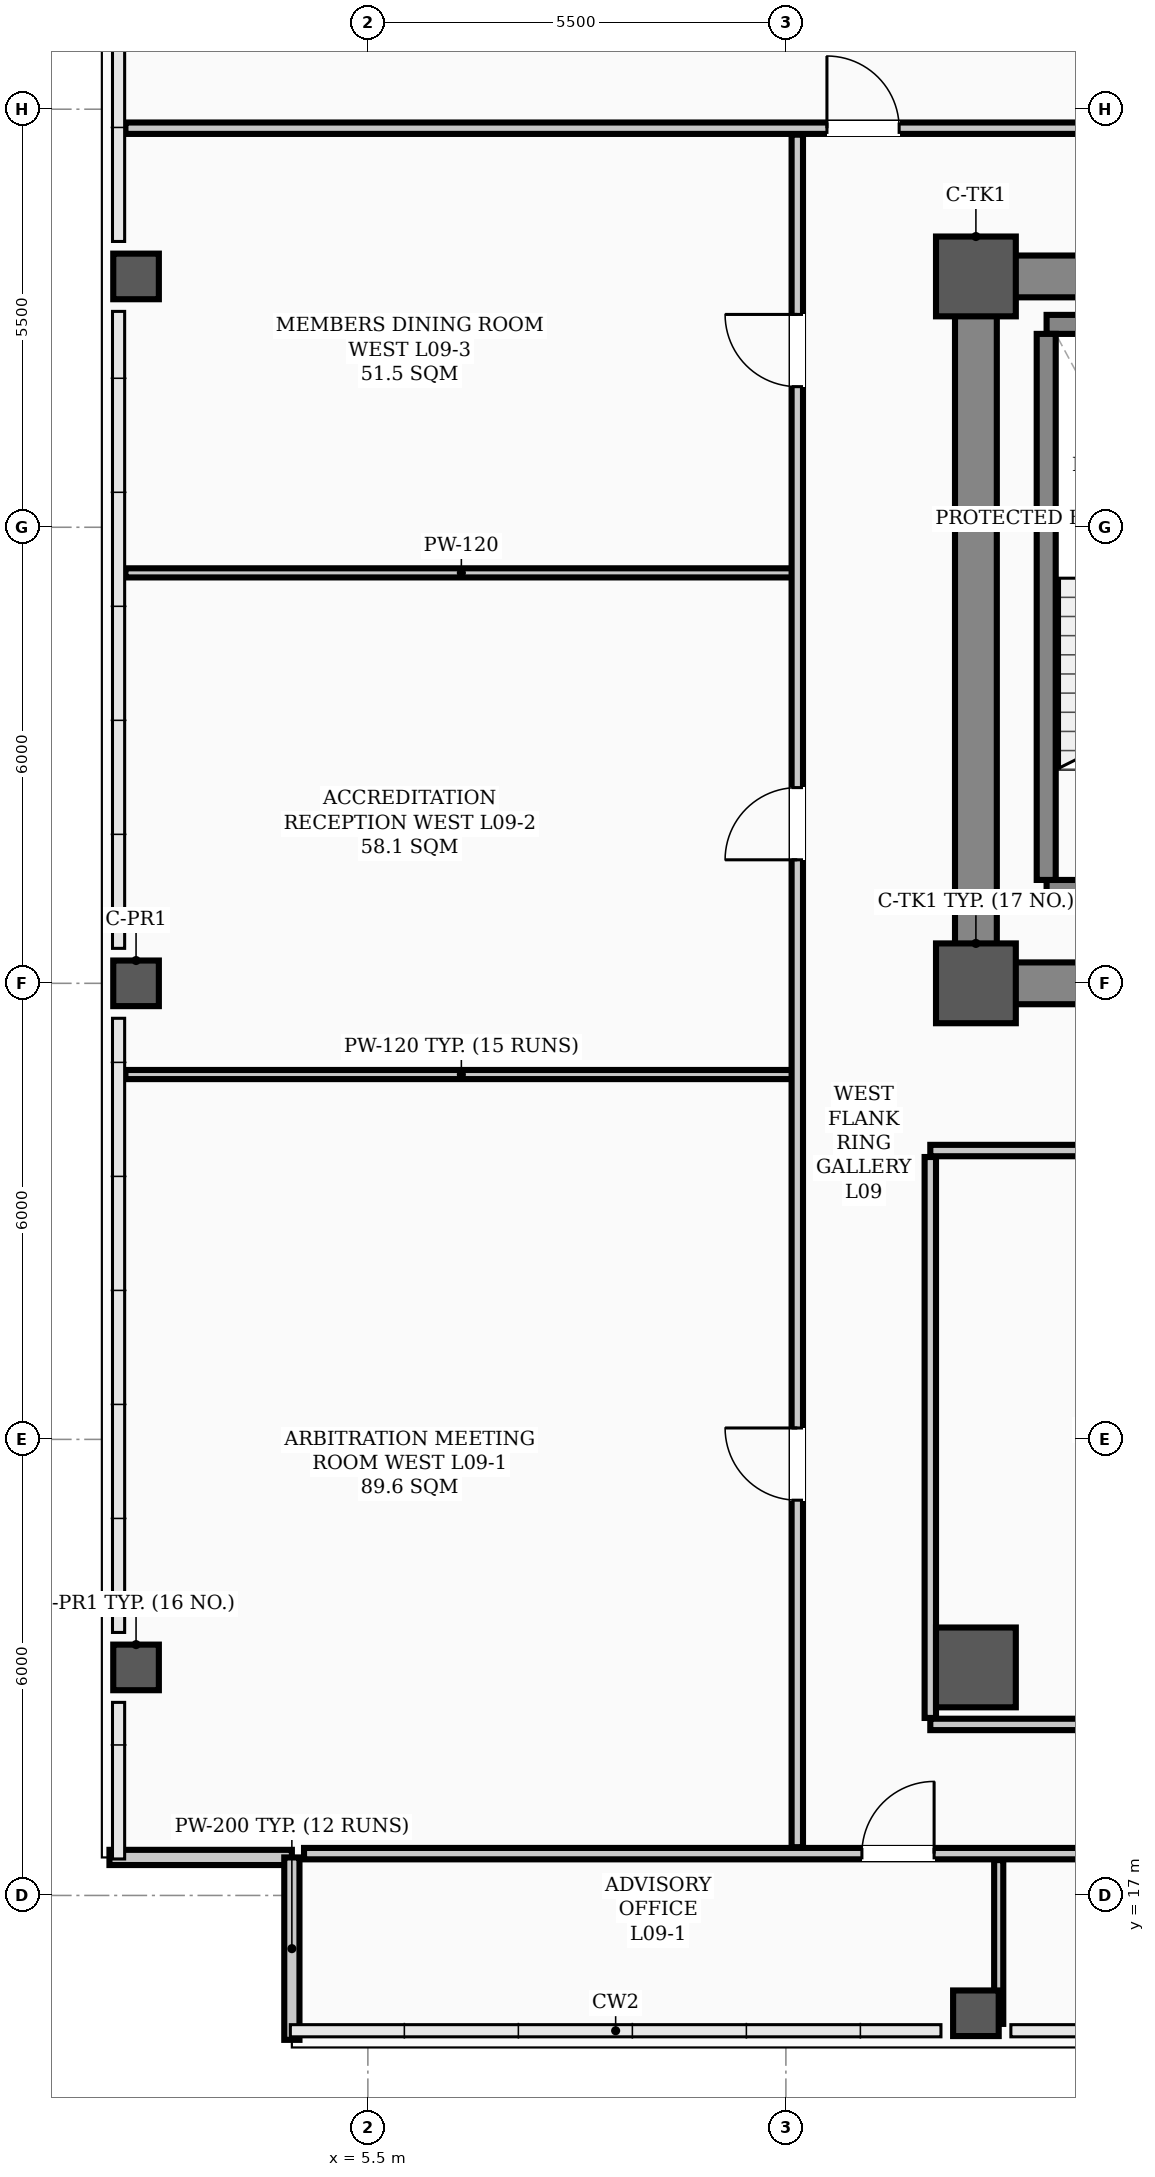
"""IFC4 building model, lengths in metres.
Left out: names, types, materials, properties, quantities, classifications, styles, units other than length and angle.
Written with IfcOpenShell. Run it as: python <this file> out.ifc"""

import sys

from ifc_helpers import new_model, si_unit, direction, frame, frame_2d, origin, origin_2d, place, context, subcontext, project, spatial, rectangle, hollow_rectangle, extrude, element, fill, save


model = new_model("IFC4")
c1 = context("Model", 3, precision=1e-05, world=origin(), true_north=direction((0.0, 1.0)))
c2 = subcontext(c1, "Body", "Model", "MODEL_VIEW")
j1 = project(units=[si_unit("LENGTHUNIT", "METRE"), si_unit("PLANEANGLEUNIT", "RADIAN")], contexts=[c1])
p1 = place(None, origin())
s1 = spatial("IfcSite", under=j1, at=p1, CompositionType="ELEMENT")
p2 = place(p1, origin())
s2 = spatial("IfcBuilding", under=s1, at=p2, CompositionType="ELEMENT")
p3 = place(p2, frame((0.0, 0.0, 38.2)))
s3 = spatial("IfcBuildingStorey", under=s2, at=p3, CompositionType="ELEMENT", Elevation=38.2)
for number, where, z_axis, x_axis in (
    (1, (13.5, 29.0, 0.0), (0.0, 0.0, 1.0), (1.0, 0.0, 0.0)),
    (2, (13.5, 38.3, 0.0), (0.0, 0.0, 1.0), (1.0, 0.0, 0.0)),
    (3, (13.5, 20.0, 0.0), (0.0, 0.0, 1.0), (1.0, 0.0, 0.0)),
):
    element("IfcColumn", number, at=place(p3, frame(where, z_axis=z_axis, x_axis=x_axis)), inside=s3, PredefinedType="COLUMN", context=c2, shape_type="SweptSolid", body=[
        extrude(hollow_rectangle(XDim=1.05, YDim=1.05, WallThickness=0.038, InnerFilletRadius=0.019, OuterFilletRadius=0.057, at=origin_2d()), origin(), (0.0, 0.0, 1.0), 3.9),
    ])
for number, where, z_axis, x_axis in (
    (4, (2.45, 20.0, 0.0), (0.0, 0.0, 1.0), (1.0, 0.0, 0.0)),
    (5, (2.45, 29.0, 0.0), (0.0, 0.0, 1.0), (1.0, 0.0, 0.0)),
    (6, (2.45, 38.3, 0.0), (0.0, 0.0, 1.0), (1.0, 0.0, 0.0)),
    (7, (13.5, 15.45, 0.0), (0.0, 0.0, 1.0), (1.0, 0.0, 0.0)),
):
    element("IfcColumn", number, at=place(p3, frame(where, z_axis=z_axis, x_axis=x_axis)), inside=s3, PredefinedType="COLUMN", context=c2, shape_type="SweptSolid", body=[
        extrude(hollow_rectangle(XDim=0.6, YDim=0.6, WallThickness=0.026, InnerFilletRadius=0.013, OuterFilletRadius=0.039, at=origin_2d()), origin(), (0.0, 0.0, 1.0), 3.9),
    ])
for number, where, z_axis, x_axis in (
    (8, (2.1, 17.5, 0.0), (0.0, 0.0, 1.0), (1.0, 0.0, 0.0)),
    (9, (4.5, 17.5, 0.0), (0.0, 0.0, 1.0), (0.0, -1.0, 0.0)),
):
    element("IfcWall", number, at=place(p3, frame(where, z_axis=z_axis, x_axis=x_axis)), inside=s3, PredefinedType="PARAPET", context=c2, shape_type="SweptSolid", body=[
        extrude(rectangle(XDim=2.4, YDim=0.2, at=frame_2d((1.2, 0.0))), origin(), (0.0, 0.0, 1.0), 1.2),
    ])
p4 = place(p3, frame((13.5, 29.0, 0.0), z_axis=(0.0, 0.0, 1.0), x_axis=(1.0, 0.0, 0.0)))
e10 = element("IfcWall", 10, at=p4, inside=s3, PredefinedType="SHEAR", context=c2, shape_type="SweptSolid", body=[
    extrude(rectangle(XDim=30.5, YDim=0.55, at=frame_2d((15.25, 0.0))), origin(), (0.0, 0.0, 1.0), 3.72),
])
p5 = place(p4, frame((1.75, 0.0, 0.0)))
e11 = element("IfcOpeningElement", 11, at=p5, cuts=e10, PredefinedType="OPENING", context=c2, shape_type="SweptSolid", body=[
    extrude(rectangle(XDim=1.1, YDim=2.08, at=frame_2d((0.55, 1.04))), frame((0.0, 0.285, 0.0), z_axis=(0.0, -1.0, 0.0), x_axis=(1.0, 0.0, 0.0)), (0.0, 0.0, 1.0), 0.57),
])
p6 = place(p4, frame((26.7, 0.0, 0.0)))
e12 = element("IfcOpeningElement", 12, at=p6, cuts=e10, PredefinedType="OPENING", context=c2, shape_type="SweptSolid", body=[
    extrude(rectangle(XDim=1.1, YDim=2.08, at=frame_2d((0.55, 1.04))), frame((0.0, 0.285, 0.0), z_axis=(0.0, -1.0, 0.0), x_axis=(1.0, 0.0, 0.0)), (0.0, 0.0, 1.0), 0.57),
])
p7 = place(p4, frame((6.8, 0.0, 0.0)))
e13 = element("IfcOpeningElement", 13, at=p7, cuts=e10, PredefinedType="OPENING", context=c2, shape_type="SweptSolid", body=[
    extrude(rectangle(XDim=1.1, YDim=2.08, at=frame_2d((0.55, 1.04))), frame((0.0, 0.285, 0.0), z_axis=(0.0, -1.0, 0.0), x_axis=(1.0, 0.0, 0.0)), (0.0, 0.0, 1.0), 0.57),
])
p8 = place(p4, frame((13.2, 0.0, 0.0)))
e14 = element("IfcOpeningElement", 14, at=p8, cuts=e10, PredefinedType="OPENING", context=c2, shape_type="SweptSolid", body=[
    extrude(rectangle(XDim=1.6, YDim=2.08, at=frame_2d((0.8, 1.04))), frame((0.0, 0.285, 0.0), z_axis=(0.0, -1.0, 0.0), x_axis=(1.0, 0.0, 0.0)), (0.0, 0.0, 1.0), 0.57),
])
p9 = place(p4, frame((19.5, 0.0, 0.0)))
e15 = element("IfcOpeningElement", 15, at=p9, cuts=e10, PredefinedType="OPENING", context=c2, shape_type="SweptSolid", body=[
    extrude(rectangle(XDim=0.9, YDim=2.08, at=frame_2d((0.45, 1.04))), frame((0.0, 0.285, 0.0), z_axis=(0.0, -1.0, 0.0), x_axis=(1.0, 0.0, 0.0)), (0.0, 0.0, 1.0), 0.57),
])
p10 = place(p4, frame((21.55, 0.0, 0.0)))
e16 = element("IfcOpeningElement", 16, at=p10, cuts=e10, PredefinedType="OPENING", context=c2, shape_type="SweptSolid", body=[
    extrude(rectangle(XDim=0.9, YDim=2.08, at=frame_2d((0.45, 1.04))), frame((0.0, 0.285, 0.0), z_axis=(0.0, -1.0, 0.0), x_axis=(1.0, 0.0, 0.0)), (0.0, 0.0, 1.0), 0.57),
])
p11 = place(p3, frame((13.5, 38.3, 0.0), z_axis=(0.0, 0.0, 1.0), x_axis=(1.0, 0.0, 0.0)))
e17 = element("IfcWall", 17, at=p11, inside=s3, PredefinedType="SHEAR", context=c2, shape_type="SweptSolid", body=[
    extrude(rectangle(XDim=30.5, YDim=0.55, at=frame_2d((15.25, 0.0))), origin(), (0.0, 0.0, 1.0), 3.72),
])
p12 = place(p3, frame((13.5, 29.35, 0.0), z_axis=(0.0, 0.0, 1.0), x_axis=(0.0, 1.0, 0.0)))
e18 = element("IfcWall", 18, at=p12, inside=s3, PredefinedType="SHEAR", context=c2, shape_type="SweptSolid", body=[
    extrude(rectangle(XDim=8.6, YDim=0.55, at=frame_2d((4.3, 0.0))), origin(), (0.0, 0.0, 1.0), 3.72),
])
p13 = place(p3, frame((14.43, 30.235, 0.0), z_axis=(0.0, 0.0, 1.0), x_axis=(1.0, 0.0, 0.0)))
e19 = element("IfcWall", 19, at=p13, inside=s3, PredefinedType="STANDARD", context=c2, shape_type="SweptSolid", body=[
    extrude(rectangle(XDim=3.34, YDim=0.25, at=frame_2d((1.67, 0.0))), origin(), (0.0, 0.0, 1.0), 3.72),
])
p14 = place(p13, frame((1.1, 0.0, 0.0)))
e20 = element("IfcOpeningElement", 20, at=p14, cuts=e19, PredefinedType="OPENING", context=c2, shape_type="SweptSolid", body=[
    extrude(rectangle(XDim=1.1, YDim=2.08, at=frame_2d((0.55, 1.04))), frame((0.0, 0.135, 0.0), z_axis=(0.0, -1.0, 0.0), x_axis=(1.0, 0.0, 0.0)), (0.0, 0.0, 1.0), 0.27),
])
p15 = place(p3, frame((14.43, 37.669, 0.0), z_axis=(0.0, 0.0, 1.0), x_axis=(1.0, 0.0, 0.0)))
e21 = element("IfcWall", 21, at=p15, inside=s3, PredefinedType="STANDARD", context=c2, shape_type="SweptSolid", body=[
    extrude(rectangle(XDim=3.34, YDim=0.25, at=frame_2d((1.67, 0.0))), origin(), (0.0, 0.0, 1.0), 3.72),
])
p16 = place(p3, frame((14.425, 30.36, 0.0), z_axis=(0.0, 0.0, 1.0), x_axis=(0.0, 1.0, 0.0)))
e22 = element("IfcWall", 22, at=p16, inside=s3, PredefinedType="STANDARD", context=c2, shape_type="SweptSolid", body=[
    extrude(rectangle(XDim=7.184, YDim=0.25, at=frame_2d((3.592, 0.0))), origin(), (0.0, 0.0, 1.0), 3.72),
])
p17 = place(p3, frame((12.9, 26.8, 0.0), z_axis=(0.0, 0.0, 1.0), x_axis=(1.0, 0.0, 0.0)))
e23 = element("IfcWall", 23, at=p17, inside=s3, PredefinedType="PARTITIONING", context=c2, shape_type="SweptSolid", body=[
    extrude(rectangle(XDim=31.7, YDim=0.15, at=frame_2d((15.85, 0.0))), origin(), (0.0, 0.0, 1.0), 3.1),
])
p18 = place(p17, frame((13.6, 0.0, 0.0)))
e24 = element("IfcOpeningElement", 24, at=p18, cuts=e23, PredefinedType="OPENING", context=c2, shape_type="SweptSolid", body=[
    extrude(rectangle(XDim=1.6, YDim=2.08, at=frame_2d((0.8, 1.04))), frame((0.0, 0.085, 0.0), z_axis=(0.0, -1.0, 0.0), x_axis=(1.0, 0.0, 0.0)), (0.0, 0.0, 1.0), 0.17),
])
p19 = place(p17, frame((2.875, 0.0, 0.0)))
e25 = element("IfcOpeningElement", 25, at=p19, cuts=e23, PredefinedType="OPENING", context=c2, shape_type="SweptSolid", body=[
    extrude(rectangle(XDim=0.95, YDim=2.08, at=frame_2d((0.475, 1.04))), frame((0.0, 0.085, 0.0), z_axis=(0.0, -1.0, 0.0), x_axis=(1.0, 0.0, 0.0)), (0.0, 0.0, 1.0), 0.17),
])
p20 = place(p17, frame((8.625, 0.0, 0.0)))
e26 = element("IfcOpeningElement", 26, at=p20, cuts=e23, PredefinedType="OPENING", context=c2, shape_type="SweptSolid", body=[
    extrude(rectangle(XDim=0.95, YDim=2.08, at=frame_2d((0.475, 1.04))), frame((0.0, 0.085, 0.0), z_axis=(0.0, -1.0, 0.0), x_axis=(1.0, 0.0, 0.0)), (0.0, 0.0, 1.0), 0.17),
])
p21 = place(p17, frame((16.075, 0.0, 0.0)))
e27 = element("IfcOpeningElement", 27, at=p21, cuts=e23, PredefinedType="OPENING", context=c2, shape_type="SweptSolid", body=[
    extrude(rectangle(XDim=0.95, YDim=2.08, at=frame_2d((0.475, 1.04))), frame((0.0, 0.085, 0.0), z_axis=(0.0, -1.0, 0.0), x_axis=(1.0, 0.0, 0.0)), (0.0, 0.0, 1.0), 0.17),
])
p22 = place(p17, frame((21.875, 0.0, 0.0)))
e28 = element("IfcOpeningElement", 28, at=p22, cuts=e23, PredefinedType="OPENING", context=c2, shape_type="SweptSolid", body=[
    extrude(rectangle(XDim=0.95, YDim=2.08, at=frame_2d((0.475, 1.04))), frame((0.0, 0.085, 0.0), z_axis=(0.0, -1.0, 0.0), x_axis=(1.0, 0.0, 0.0)), (0.0, 0.0, 1.0), 0.17),
])
p23 = place(p17, frame((29.025, 0.0, 0.0)))
e29 = element("IfcOpeningElement", 29, at=p23, cuts=e23, PredefinedType="OPENING", context=c2, shape_type="SweptSolid", body=[
    extrude(rectangle(XDim=0.95, YDim=2.08, at=frame_2d((0.475, 1.04))), frame((0.0, 0.085, 0.0), z_axis=(0.0, -1.0, 0.0), x_axis=(1.0, 0.0, 0.0)), (0.0, 0.0, 1.0), 0.17),
])
p24 = place(p3, frame((4.66, 17.55, 0.0), z_axis=(0.0, 0.0, 1.0), x_axis=(1.0, 0.0, 0.0)))
e30 = element("IfcWall", 30, at=p24, inside=s3, PredefinedType="PARTITIONING", context=c2, shape_type="SweptSolid", body=[
    extrude(rectangle(XDim=44.68, YDim=0.15, at=frame_2d((22.34, 0.0))), origin(), (0.0, 0.0, 1.0), 3.1),
])
p25 = place(p24, frame((7.34, 0.0, 0.0)))
e31 = element("IfcOpeningElement", 31, at=p25, cuts=e30, PredefinedType="OPENING", context=c2, shape_type="SweptSolid", body=[
    extrude(rectangle(XDim=0.95, YDim=2.08, at=frame_2d((0.475, 1.04))), frame((0.0, 0.085, 0.0), z_axis=(0.0, -1.0, 0.0), x_axis=(1.0, 0.0, 0.0)), (0.0, 0.0, 1.0), 0.17),
])
p26 = place(p24, frame((12.465, 0.0, 0.0)))
e32 = element("IfcOpeningElement", 32, at=p26, cuts=e30, PredefinedType="OPENING", context=c2, shape_type="SweptSolid", body=[
    extrude(rectangle(XDim=0.95, YDim=2.08, at=frame_2d((0.475, 1.04))), frame((0.0, 0.085, 0.0), z_axis=(0.0, -1.0, 0.0), x_axis=(1.0, 0.0, 0.0)), (0.0, 0.0, 1.0), 0.17),
])
p27 = place(p24, frame((29.265, 0.0, 0.0)))
e33 = element("IfcOpeningElement", 33, at=p27, cuts=e30, PredefinedType="OPENING", context=c2, shape_type="SweptSolid", body=[
    extrude(rectangle(XDim=0.95, YDim=2.08, at=frame_2d((0.475, 1.04))), frame((0.0, 0.085, 0.0), z_axis=(0.0, -1.0, 0.0), x_axis=(1.0, 0.0, 0.0)), (0.0, 0.0, 1.0), 0.17),
])
p28 = place(p24, frame((37.265, 0.0, 0.0)))
e34 = element("IfcOpeningElement", 34, at=p28, cuts=e30, PredefinedType="OPENING", context=c2, shape_type="SweptSolid", body=[
    extrude(rectangle(XDim=0.95, YDim=2.08, at=frame_2d((0.475, 1.04))), frame((0.0, 0.085, 0.0), z_axis=(0.0, -1.0, 0.0), x_axis=(1.0, 0.0, 0.0)), (0.0, 0.0, 1.0), 0.17),
])
p29 = place(p3, frame((12.9, 19.25, 0.0), z_axis=(0.0, 0.0, 1.0), x_axis=(1.0, 0.0, 0.0)))
e35 = element("IfcWall", 35, at=p29, inside=s3, PredefinedType="PARTITIONING", context=c2, shape_type="SweptSolid", body=[
    extrude(rectangle(XDim=13.3, YDim=0.15, at=frame_2d((6.65, 0.0))), origin(), (0.0, 0.0, 1.0), 3.1),
])
for number, where, z_axis, x_axis in (
    (36, (2.31, 27.8, 0.0), (0.0, 0.0, 1.0), (1.0, 0.0, 0.0)),
    (37, (2.31, 34.4, 0.0), (0.0, 0.0, 1.0), (1.0, 0.0, 0.0)),
):
    element("IfcWall", number, at=place(p3, frame(where, z_axis=z_axis, x_axis=x_axis)), inside=s3, PredefinedType="PARTITIONING", context=c2, shape_type="SweptSolid", body=[
        extrude(rectangle(XDim=8.84, YDim=0.12, at=frame_2d((4.42, 0.0))), origin(), (0.0, 0.0, 1.0), 3.212),
    ])
p30 = place(p3, frame((2.31, 40.25, 0.0), z_axis=(0.0, 0.0, 1.0), x_axis=(1.0, 0.0, 0.0)))
e38 = element("IfcWall", 38, at=p30, inside=s3, PredefinedType="PARTITIONING", context=c2, shape_type="SweptSolid", body=[
    extrude(rectangle(XDim=49.38, YDim=0.15, at=frame_2d((24.69, 0.0))), origin(), (0.0, 0.0, 1.0), 3.1),
])
p31 = place(p30, frame((9.23, 0.0, 0.0)))
e39 = element("IfcOpeningElement", 39, at=p31, cuts=e38, PredefinedType="OPENING", context=c2, shape_type="SweptSolid", body=[
    extrude(rectangle(XDim=0.95, YDim=2.08, at=frame_2d((0.475, 1.04))), frame((0.0, 0.085, 0.0), z_axis=(0.0, -1.0, 0.0), x_axis=(1.0, 0.0, 0.0)), (0.0, 0.0, 1.0), 0.17),
])
p32 = place(p30, frame((23.115, 0.0, 0.0)))
e40 = element("IfcOpeningElement", 40, at=p32, cuts=e38, PredefinedType="OPENING", context=c2, shape_type="SweptSolid", body=[
    extrude(rectangle(XDim=0.95, YDim=2.08, at=frame_2d((0.475, 1.04))), frame((0.0, 0.085, 0.0), z_axis=(0.0, -1.0, 0.0), x_axis=(1.0, 0.0, 0.0)), (0.0, 0.0, 1.0), 0.17),
])
p33 = place(p30, frame((31.515, 0.0, 0.0)))
e41 = element("IfcOpeningElement", 41, at=p33, cuts=e38, PredefinedType="OPENING", context=c2, shape_type="SweptSolid", body=[
    extrude(rectangle(XDim=0.95, YDim=2.08, at=frame_2d((0.475, 1.04))), frame((0.0, 0.085, 0.0), z_axis=(0.0, -1.0, 0.0), x_axis=(1.0, 0.0, 0.0)), (0.0, 0.0, 1.0), 0.17),
])
p34 = place(p30, frame((42.7, 0.0, 0.0)))
e42 = element("IfcOpeningElement", 42, at=p34, cuts=e38, PredefinedType="OPENING", context=c2, shape_type="SweptSolid", body=[
    extrude(rectangle(XDim=0.95, YDim=2.08, at=frame_2d((0.475, 1.04))), frame((0.0, 0.085, 0.0), z_axis=(0.0, -1.0, 0.0), x_axis=(1.0, 0.0, 0.0)), (0.0, 0.0, 1.0), 0.17),
])
p35 = place(p3, frame((11.15, 17.635, 0.0), z_axis=(0.0, 0.0, 1.0), x_axis=(0.0, 1.0, 0.0)))
e43 = element("IfcWall", 43, at=p35, inside=s3, PredefinedType="PARTITIONING", context=c2, shape_type="SweptSolid", body=[
    extrude(rectangle(XDim=22.53, YDim=0.15, at=frame_2d((11.265, 0.0))), origin(), (0.0, 0.0, 1.0), 3.0),
])
p36 = place(p35, frame((4.565, 0.0, 0.0)))
e44 = element("IfcOpeningElement", 44, at=p36, cuts=e43, PredefinedType="OPENING", context=c2, shape_type="SweptSolid", body=[
    extrude(rectangle(XDim=0.95, YDim=2.08, at=frame_2d((0.475, 1.04))), frame((0.0, 0.085, 0.0), z_axis=(0.0, -1.0, 0.0), x_axis=(1.0, 0.0, 0.0)), (0.0, 0.0, 1.0), 0.17),
])
p37 = place(p35, frame((12.99, 0.0, 0.0)))
e45 = element("IfcOpeningElement", 45, at=p37, cuts=e43, PredefinedType="OPENING", context=c2, shape_type="SweptSolid", body=[
    extrude(rectangle(XDim=0.95, YDim=2.08, at=frame_2d((0.475, 1.04))), frame((0.0, 0.085, 0.0), z_axis=(0.0, -1.0, 0.0), x_axis=(1.0, 0.0, 0.0)), (0.0, 0.0, 1.0), 0.17),
])
p38 = place(p35, frame((19.215, 0.0, 0.0)))
e46 = element("IfcOpeningElement", 46, at=p38, cuts=e43, PredefinedType="OPENING", context=c2, shape_type="SweptSolid", body=[
    extrude(rectangle(XDim=0.95, YDim=2.08, at=frame_2d((0.475, 1.04))), frame((0.0, 0.085, 0.0), z_axis=(0.0, -1.0, 0.0), x_axis=(1.0, 0.0, 0.0)), (0.0, 0.0, 1.0), 0.17),
])
p39 = place(p3, frame((12.9, 19.335, 0.0), z_axis=(0.0, 0.0, 1.0), x_axis=(0.0, 1.0, 0.0)))
e47 = element("IfcWall", 47, at=p39, inside=s3, PredefinedType="PARTITIONING", context=c2, shape_type="SweptSolid", body=[
    extrude(rectangle(XDim=7.38, YDim=0.15, at=frame_2d((3.69, 0.0))), origin(), (0.0, 0.0, 1.0), 3.0),
])
p40 = place(p3, frame((13.8, 15.31, 0.0), z_axis=(0.0, 0.0, 1.0), x_axis=(0.0, 1.0, 0.0)))
e48 = element("IfcWall", 48, at=p40, inside=s3, PredefinedType="PARTITIONING", context=c2, shape_type="SweptSolid", body=[
    extrude(rectangle(XDim=2.155, YDim=0.12, at=frame_2d((1.078, 0.0))), origin(), (0.0, 0.0, 1.0), 3.1),
])
p41 = place(p25, origin())
e49 = element("IfcDoor", 49, at=p41, inside=s3, OperationType="SINGLE_SWING_RIGHT", PredefinedType="DOOR", context=c2, shape_type="SweptSolid", body=[
    extrude(rectangle(XDim=0.95, YDim=2.08, at=frame_2d((0.475, 1.04))), frame((0.0, 0.025, 0.0), z_axis=(0.0, -1.0, 0.0), x_axis=(1.0, 0.0, 0.0)), (0.0, 0.0, 1.0), 0.05),
])
fill(e31, e49)
p42 = place(p36, origin())
e50 = element("IfcDoor", 50, at=p42, inside=s3, OperationType="SINGLE_SWING_RIGHT", PredefinedType="DOOR", context=c2, shape_type="SweptSolid", body=[
    extrude(rectangle(XDim=0.95, YDim=2.08, at=frame_2d((0.475, 1.04))), frame((0.0, 0.025, 0.0), z_axis=(0.0, -1.0, 0.0), x_axis=(1.0, 0.0, 0.0)), (0.0, 0.0, 1.0), 0.05),
])
fill(e44, e50)
p43 = place(p37, origin())
e51 = element("IfcDoor", 51, at=p43, inside=s3, OperationType="SINGLE_SWING_LEFT", PredefinedType="DOOR", context=c2, shape_type="SweptSolid", body=[
    extrude(rectangle(XDim=0.95, YDim=2.08, at=frame_2d((0.475, 1.04))), frame((0.0, 0.025, 0.0), z_axis=(0.0, -1.0, 0.0), x_axis=(1.0, 0.0, 0.0)), (0.0, 0.0, 1.0), 0.05),
])
fill(e45, e51)
p44 = place(p38, origin())
e52 = element("IfcDoor", 52, at=p44, inside=s3, OperationType="SINGLE_SWING_RIGHT", PredefinedType="DOOR", context=c2, shape_type="SweptSolid", body=[
    extrude(rectangle(XDim=0.95, YDim=2.08, at=frame_2d((0.475, 1.04))), frame((0.0, 0.025, 0.0), z_axis=(0.0, -1.0, 0.0), x_axis=(1.0, 0.0, 0.0)), (0.0, 0.0, 1.0), 0.05),
])
fill(e46, e52)
p45 = place(p31, origin())
e53 = element("IfcDoor", 53, at=p45, inside=s3, OperationType="SINGLE_SWING_LEFT", PredefinedType="DOOR", context=c2, shape_type="SweptSolid", body=[
    extrude(rectangle(XDim=0.95, YDim=2.08, at=frame_2d((0.475, 1.04))), frame((0.0, 0.025, 0.0), z_axis=(0.0, -1.0, 0.0), x_axis=(1.0, 0.0, 0.0)), (0.0, 0.0, 1.0), 0.05),
])
fill(e39, e53)
save(model, sys.argv[1])
